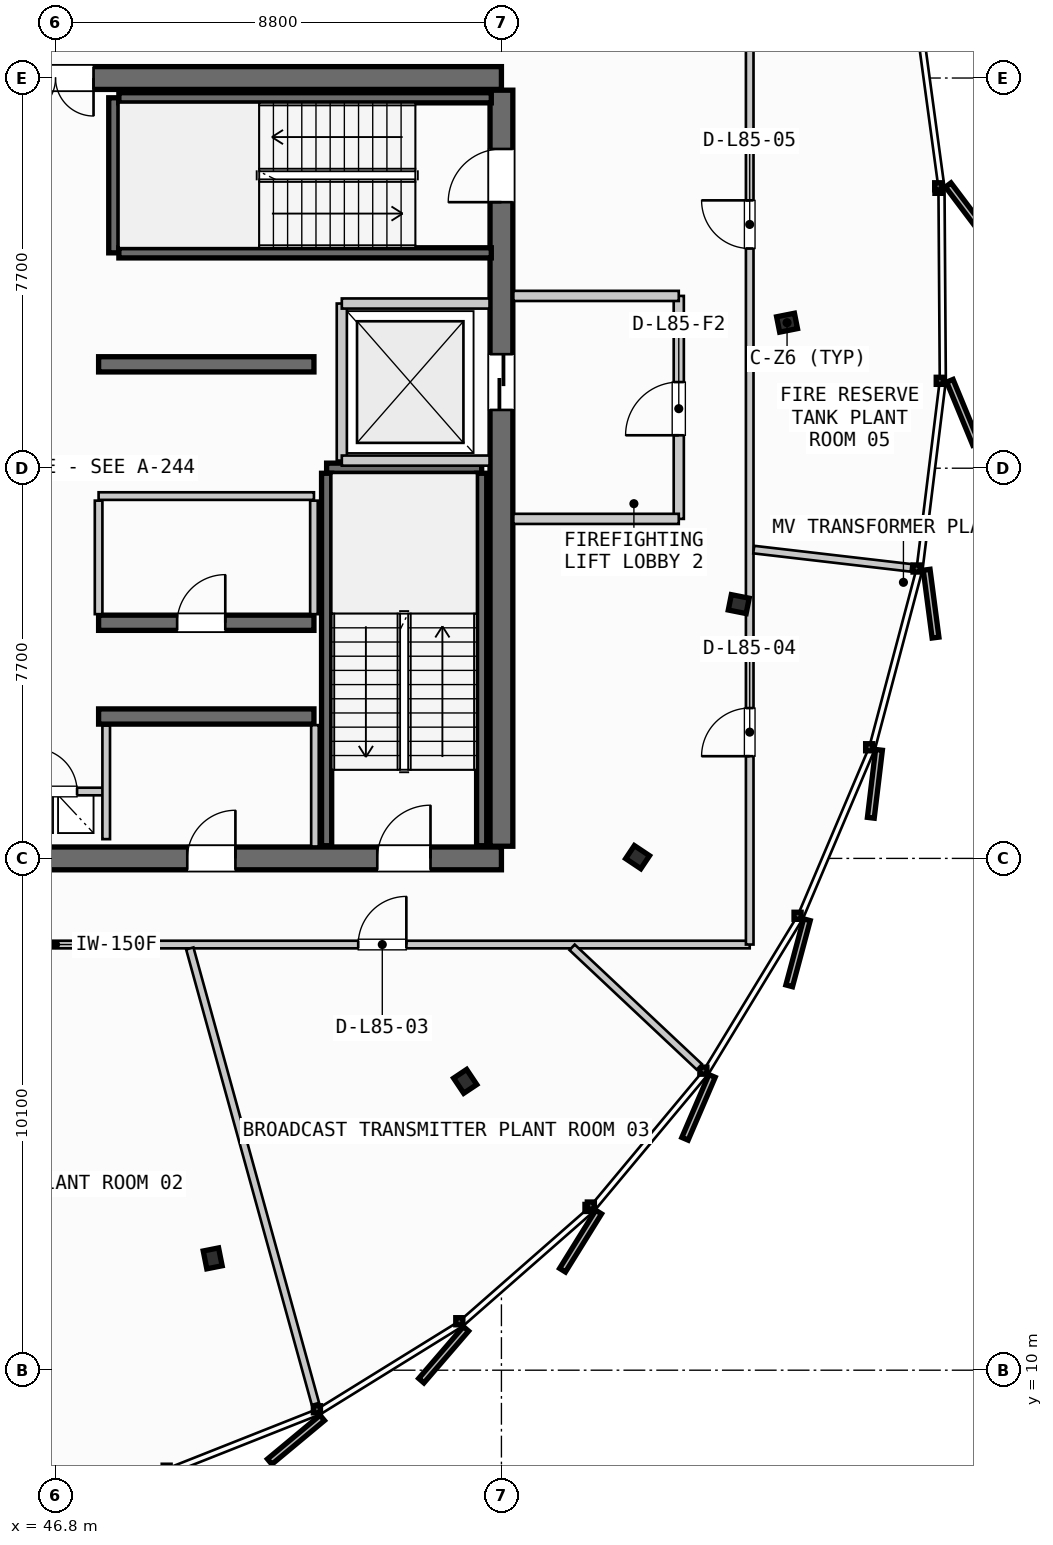
"""IFC4 building model, lengths in metres.
Left out: names, types, materials, properties, quantities, classifications, styles, units other than length and angle.
Written with IfcOpenShell. Run it as: python <this file> out.ifc"""

import sys

from ifc_helpers import new_model, si_unit, direction, frame, frame_2d, origin, origin_2d, place, context, subcontext, project, spatial, rectangle, i_section, extrude, source, transform, mapped, element, fill, save


model = new_model("IFC4")
c1 = context("Model", 3, precision=1e-05, world=origin(), true_north=direction((0.0, 1.0)))
c2 = subcontext(c1, "Body", "Model", "MODEL_VIEW")
j1 = project(units=[si_unit("LENGTHUNIT", "METRE"), si_unit("PLANEANGLEUNIT", "RADIAN")], contexts=[c1])
p1 = place(None, origin())
s1 = spatial("IfcSite", under=j1, at=p1, CompositionType="ELEMENT")
p2 = place(p1, origin())
s2 = spatial("IfcBuilding", under=s1, at=p2, CompositionType="ELEMENT")
p3 = place(p2, frame((0.0, 0.0, 320.3)))
s3 = spatial("IfcBuildingStorey", under=s2, at=p3, CompositionType="ELEMENT", Elevation=320.3)
p4 = place(p3, frame((38.0, 20.1, 0.0), z_axis=(0.0, 0.0, 1.0), x_axis=(1.0, 0.0, 0.0)))
e1 = element("IfcWall", 1, at=p4, inside=s3, PredefinedType="SHEAR", context=c2, shape_type="SweptSolid", body=[
    extrude(rectangle(XDim=17.6, YDim=0.45, at=frame_2d((8.8, 0.0))), origin(), (0.0, 0.0, 1.0), 3.735),
])
p5 = place(p4, frame((1.4, 0.0, 0.0)))
e2 = element("IfcOpeningElement", 2, at=p5, cuts=e1, PredefinedType="OPENING", context=c2, shape_type="SweptSolid", body=[
    extrude(rectangle(XDim=1.05, YDim=2.15, at=frame_2d((0.525, 1.075))), frame((0.0, 0.235, 0.0), z_axis=(0.0, -1.0, 0.0), x_axis=(1.0, 0.0, 0.0)), (0.0, 0.0, 1.0), 0.47),
])
p6 = place(p4, frame((15.15, 0.0, 0.0)))
e3 = element("IfcOpeningElement", 3, at=p6, cuts=e1, PredefinedType="OPENING", context=c2, shape_type="SweptSolid", body=[
    extrude(rectangle(XDim=1.05, YDim=2.15, at=frame_2d((0.525, 1.075))), frame((0.0, 0.235, 0.0), z_axis=(0.0, -1.0, 0.0), x_axis=(1.0, 0.0, 0.0)), (0.0, 0.0, 1.0), 0.47),
])
p7 = place(p4, frame((5.25, 0.0, 0.0)))
e4 = element("IfcOpeningElement", 4, at=p7, cuts=e1, PredefinedType="OPENING", context=c2, shape_type="SweptSolid", body=[
    extrude(rectangle(XDim=0.95, YDim=2.15, at=frame_2d((0.475, 1.075))), frame((0.0, 0.235, 0.0), z_axis=(0.0, -1.0, 0.0), x_axis=(1.0, 0.0, 0.0)), (0.0, 0.0, 1.0), 0.47),
])
p8 = place(p4, frame((11.4, 0.0, 0.0)))
e5 = element("IfcOpeningElement", 5, at=p8, cuts=e1, PredefinedType="OPENING", context=c2, shape_type="SweptSolid", body=[
    extrude(rectangle(XDim=0.95, YDim=2.15, at=frame_2d((0.475, 1.075))), frame((0.0, 0.235, 0.0), z_axis=(0.0, -1.0, 0.0), x_axis=(1.0, 0.0, 0.0)), (0.0, 0.0, 1.0), 0.47),
])
p9 = place(p3, frame((55.6, 35.5, 0.0), z_axis=(0.0, 0.0, 1.0), x_axis=(-1.0, 0.0, 0.0)))
e6 = element("IfcWall", 6, at=p9, inside=s3, PredefinedType="SHEAR", context=c2, shape_type="SweptSolid", body=[
    extrude(rectangle(XDim=17.6, YDim=0.45, at=frame_2d((8.8, 0.0))), origin(), (0.0, 0.0, 1.0), 3.735),
])
p10 = place(p9, frame((8.05, 0.0, 0.0)))
e7 = element("IfcOpeningElement", 7, at=p10, cuts=e6, PredefinedType="OPENING", context=c2, shape_type="SweptSolid", body=[
    extrude(rectangle(XDim=1.5, YDim=2.2, at=frame_2d((0.75, 1.1))), frame((0.0, 0.235, 0.0), z_axis=(0.0, -1.0, 0.0), x_axis=(1.0, 0.0, 0.0)), (0.0, 0.0, 1.0), 0.47),
])
p11 = place(p9, frame((15.85, 0.0, 0.0)))
e8 = element("IfcOpeningElement", 8, at=p11, cuts=e6, PredefinedType="OPENING", context=c2, shape_type="SweptSolid", body=[
    extrude(rectangle(XDim=0.85, YDim=2.15, at=frame_2d((0.425, 1.075))), frame((0.0, 0.235, 0.0), z_axis=(0.0, -1.0, 0.0), x_axis=(1.0, 0.0, 0.0)), (0.0, 0.0, 1.0), 0.47),
])
p12 = place(p9, frame((14.35, 0.0, 0.0)))
e9 = element("IfcOpeningElement", 9, at=p12, cuts=e6, PredefinedType="OPENING", context=c2, shape_type="SweptSolid", body=[
    extrude(rectangle(XDim=0.85, YDim=2.15, at=frame_2d((0.425, 1.075))), frame((0.0, 0.235, 0.0), z_axis=(0.0, -1.0, 0.0), x_axis=(1.0, 0.0, 0.0)), (0.0, 0.0, 1.0), 0.47),
])
p13 = place(p9, frame((12.3, 0.0, 0.0)))
e10 = element("IfcOpeningElement", 10, at=p13, cuts=e6, PredefinedType="OPENING", context=c2, shape_type="SweptSolid", body=[
    extrude(rectangle(XDim=0.95, YDim=2.15, at=frame_2d((0.475, 1.075))), frame((0.0, 0.235, 0.0), z_axis=(0.0, -1.0, 0.0), x_axis=(1.0, 0.0, 0.0)), (0.0, 0.0, 1.0), 0.47),
])
p14 = place(p9, frame((10.2, 0.0, 0.0)))
e11 = element("IfcOpeningElement", 11, at=p14, cuts=e6, PredefinedType="OPENING", context=c2, shape_type="SweptSolid", body=[
    extrude(rectangle(XDim=0.9, YDim=2.15, at=frame_2d((0.45, 1.075))), frame((0.0, 0.235, 0.0), z_axis=(0.0, -1.0, 0.0), x_axis=(1.0, 0.0, 0.0)), (0.0, 0.0, 1.0), 0.47),
])
p15 = place(p3, frame((55.6, 20.34, 0.0), z_axis=(0.0, 0.0, 1.0), x_axis=(0.0, 1.0, 0.0)))
e12 = element("IfcWall", 12, at=p15, inside=s3, PredefinedType="SHEAR", context=c2, shape_type="SweptSolid", body=[
    extrude(rectangle(XDim=14.92, YDim=0.45, at=frame_2d((7.46, 0.0))), origin(), (0.0, 0.0, 1.0), 3.735),
])
p16 = place(p15, frame((12.71, 0.0, 0.0)))
e13 = element("IfcOpeningElement", 13, at=p16, cuts=e12, PredefinedType="OPENING", context=c2, shape_type="SweptSolid", body=[
    extrude(rectangle(XDim=1.05, YDim=2.15, at=frame_2d((0.525, 1.075))), frame((0.0, 0.235, 0.0), z_axis=(0.0, -1.0, 0.0), x_axis=(1.0, 0.0, 0.0)), (0.0, 0.0, 1.0), 0.47),
])
p17 = place(p15, frame((8.61, 0.0, 0.0)))
e14 = element("IfcOpeningElement", 14, at=p17, cuts=e12, PredefinedType="OPENING", context=c2, shape_type="SweptSolid", body=[
    extrude(rectangle(XDim=1.1, YDim=2.2, at=frame_2d((0.55, 1.1))), frame((0.0, 0.235, 0.0), z_axis=(0.0, -1.0, 0.0), x_axis=(1.0, 0.0, 0.0)), (0.0, 0.0, 1.0), 0.47),
])
p18 = place(p3, frame((47.65, 22.9, 0.0), z_axis=(0.0, 0.0, 1.0), x_axis=(1.0, 0.0, 0.0)))
e15 = element("IfcWall", 15, at=p18, inside=s3, PredefinedType="SHEAR", context=c2, shape_type="SweptSolid", body=[
    extrude(rectangle(XDim=4.25, YDim=0.3, at=frame_2d((2.125, 0.0))), origin(), (0.0, 0.0, 1.0), 3.735),
])
p19 = place(p3, frame((47.65, 24.75, 0.0), z_axis=(0.0, 0.0, 1.0), x_axis=(1.0, 0.0, 0.0)))
e16 = element("IfcWall", 16, at=p19, inside=s3, PredefinedType="SHEAR", context=c2, shape_type="SweptSolid", body=[
    extrude(rectangle(XDim=4.25, YDim=0.3, at=frame_2d((2.125, 0.0))), origin(), (0.0, 0.0, 1.0), 3.735),
])
p20 = place(p19, frame((1.55, 0.0, 0.0)))
e17 = element("IfcOpeningElement", 17, at=p20, cuts=e16, PredefinedType="OPENING", context=c2, shape_type="SweptSolid", body=[
    extrude(rectangle(XDim=0.95, YDim=2.15, at=frame_2d((0.475, 1.075))), frame((0.0, 0.16, 0.0), z_axis=(0.0, -1.0, 0.0), x_axis=(1.0, 0.0, 0.0)), (0.0, 0.0, 1.0), 0.32),
])
p21 = place(p3, frame((47.65, 29.85, 0.0), z_axis=(0.0, 0.0, 1.0), x_axis=(1.0, 0.0, 0.0)))
e18 = element("IfcWall", 18, at=p21, inside=s3, PredefinedType="SHEAR", context=c2, shape_type="SweptSolid", body=[
    extrude(rectangle(XDim=4.25, YDim=0.3, at=frame_2d((2.125, 0.0))), origin(), (0.0, 0.0, 1.0), 3.735),
])
m1 = source(origin(), c2, "Body", "SweptSolid", [
    extrude(i_section(OverallWidth=0.309, OverallDepth=0.359, WebThickness=0.016, FlangeThickness=0.026, FilletRadius=0.027, at=origin_2d()), origin(), (0.0, 0.0, 1.0), 3.735),
])
for number, where, z_axis, x_axis in (
    (19, (61.237, 30.672, 0.0), (0.0, 0.0, 1.0), (0.981, 0.195, 0.0)),
    (20, (49.902, 12.207, 0.0), (0.0, 0.0, 1.0), (0.195, -0.981, 0.0)),
    (21, (54.885, 15.7, 0.0), (0.0, 0.0, 1.0), (0.556, -0.831, 0.0)),
    (22, (58.287, 20.125, 0.0), (0.0, 0.0, 1.0), (0.831, -0.556, 0.0)),
    (23, (60.284, 25.118, 0.0), (0.0, 0.0, 1.0), (0.981, -0.195, 0.0)),
):
    element("IfcColumn", number, at=place(p3, frame(where, z_axis=z_axis, x_axis=x_axis)), inside=s3, PredefinedType="COLUMN", context=c2, shape_type="MappedRepresentation", body=[
        mapped(m1, transform((0.0, 0.0, 0.0), scale=1.0)),
    ])
p22 = place(p3, frame((52.15, 27.8, 0.0), z_axis=(0.0, 0.0, 1.0), x_axis=(1.0, 0.0, 0.0)))
e24 = element("IfcWall", 24, at=p22, inside=s3, PredefinedType="SHEAR", context=c2, shape_type="SweptSolid", body=[
    extrude(rectangle(XDim=3.06, YDim=0.2, at=frame_2d((1.53, 0.0))), origin(), (0.0, 0.0, 1.0), 3.735),
])
for number, where, z_axis, x_axis in (
    (25, (55.21, 27.7, 0.0), (0.0, 0.0, 1.0), (0.0, -1.0, 0.0)),
    (26, (52.15, 20.35, 0.0), (0.0, 0.0, 1.0), (0.0, 1.0, 0.0)),
):
    element("IfcWall", number, at=place(p3, frame(where, z_axis=z_axis, x_axis=x_axis)), inside=s3, PredefinedType="SHEAR", context=c2, shape_type="SweptSolid", body=[
        extrude(rectangle(XDim=7.35, YDim=0.2, at=frame_2d((3.675, 0.0))), origin(), (0.0, 0.0, 1.0), 3.735),
    ])
p23 = place(p3, frame((47.95, 32.05, 0.0), z_axis=(0.0, 0.0, 1.0), x_axis=(0.0, 1.0, 0.0)))
e27 = element("IfcWall", 27, at=p23, inside=s3, PredefinedType="SHEAR", context=c2, shape_type="SweptSolid", body=[
    extrude(rectangle(XDim=3.06, YDim=0.2, at=frame_2d((1.53, 0.0))), origin(), (0.0, 0.0, 1.0), 3.735),
])
for number, where, z_axis, x_axis in (
    (28, (48.05, 35.11, 0.0), (0.0, 0.0, 1.0), (1.0, 0.0, 0.0)),
    (29, (55.4, 32.05, 0.0), (0.0, 0.0, 1.0), (-1.0, 0.0, 0.0)),
):
    element("IfcWall", number, at=place(p3, frame(where, z_axis=z_axis, x_axis=x_axis)), inside=s3, PredefinedType="SHEAR", context=c2, shape_type="SweptSolid", body=[
        extrude(rectangle(XDim=7.35, YDim=0.2, at=frame_2d((3.675, 0.0))), origin(), (0.0, 0.0, 1.0), 3.735),
    ])
p24 = place(p3, frame((45.8, 21.42, 0.0), z_axis=(0.0, 0.0, 1.0), x_axis=(1.0, 0.0, 0.0)))
e30 = element("IfcWall", 30, at=p24, inside=s3, PredefinedType="PARTITIONING", context=c2, shape_type="SweptSolid", body=[
    extrude(rectangle(XDim=2.0, YDim=0.15, at=frame_2d((1.0, 0.0))), origin(), (0.0, 0.0, 1.0), 3.26),
])
p25 = place(p24, frame((0.575, 0.0, 0.0)))
e31 = element("IfcOpeningElement", 31, at=p25, cuts=e30, PredefinedType="OPENING", context=c2, shape_type="SweptSolid", body=[
    extrude(rectangle(XDim=0.85, YDim=2.15, at=frame_2d((0.425, 1.075))), frame((0.0, 0.085, 0.0), z_axis=(0.0, -1.0, 0.0), x_axis=(1.0, 0.0, 0.0)), (0.0, 0.0, 1.0), 0.17),
])
p26 = place(p3, frame((47.8, 20.48, 0.0), z_axis=(0.0, 0.0, 1.0), x_axis=(0.0, 1.0, 0.0)))
e32 = element("IfcWall", 32, at=p26, inside=s3, PredefinedType="PARTITIONING", context=c2, shape_type="SweptSolid", body=[
    extrude(rectangle(XDim=2.24, YDim=0.15, at=frame_2d((1.12, 0.0))), origin(), (0.0, 0.0, 1.0), 3.26),
])
p27 = place(p3, frame((52.45, 27.95, 0.0), z_axis=(0.0, 0.0, 1.0), x_axis=(0.0, 1.0, 0.0)))
e33 = element("IfcWall", 33, at=p27, inside=s3, PredefinedType="PARTITIONING", context=c2, shape_type="SweptSolid", body=[
    extrude(rectangle(XDim=3.1, YDim=0.2, at=frame_2d((1.55, 0.0))), origin(), (0.0, 0.0, 1.0), 3.26),
])
for number, where, z_axis, x_axis in (
    (34, (52.45, 27.95, 0.0), (0.0, 0.0, 1.0), (1.0, 0.0, 0.0)),
    (35, (52.45, 31.05, 0.0), (0.0, 0.0, 1.0), (1.0, 0.0, 0.0)),
):
    element("IfcWall", number, at=place(p3, frame(where, z_axis=z_axis, x_axis=x_axis)), inside=s3, PredefinedType="PARTITIONING", context=c2, shape_type="SweptSolid", body=[
        extrude(rectangle(XDim=2.915, YDim=0.2, at=frame_2d((1.458, 0.0))), origin(), (0.0, 0.0, 1.0), 3.26),
    ])
p28 = place(p3, frame((59.1, 26.8, 0.0), z_axis=(0.0, 0.0, 1.0), x_axis=(0.0, 1.0, 0.0)))
e36 = element("IfcWall", 36, at=p28, inside=s3, PredefinedType="PARTITIONING", context=c2, shape_type="SweptSolid", body=[
    extrude(rectangle(XDim=4.4, YDim=0.2, at=frame_2d((2.2, 0.0))), origin(), (0.0, 0.0, 1.0), 3.26),
])
p29 = place(p28, frame((1.65, 0.0, 0.0)))
e37 = element("IfcOpeningElement", 37, at=p29, cuts=e36, PredefinedType="OPENING", context=c2, shape_type="SweptSolid", body=[
    extrude(rectangle(XDim=1.05, YDim=2.15, at=frame_2d((0.525, 1.075))), frame((0.0, 0.11, 0.0), z_axis=(0.0, -1.0, 0.0), x_axis=(1.0, 0.0, 0.0)), (0.0, 0.0, 1.0), 0.22),
])
for number, where, z_axis, x_axis in (
    (38, (55.835, 26.8, 0.0), (0.0, 0.0, 1.0), (1.0, 0.0, 0.0)),
    (39, (55.835, 31.2, 0.0), (0.0, 0.0, 1.0), (1.0, 0.0, 0.0)),
):
    element("IfcWall", number, at=place(p3, frame(where, z_axis=z_axis, x_axis=x_axis)), inside=s3, PredefinedType="PARTITIONING", context=c2, shape_type="SweptSolid", body=[
        extrude(rectangle(XDim=3.265, YDim=0.2, at=frame_2d((1.633, 0.0))), origin(), (0.0, 0.0, 1.0), 3.26),
    ])
p30 = place(p3, frame((51.92, 20.335, 0.0), z_axis=(0.0, 0.0, 1.0), x_axis=(0.0, 1.0, 0.0)))
e40 = element("IfcWall", 40, at=p30, inside=s3, PredefinedType="PARTITIONING", context=c2, shape_type="SweptSolid", body=[
    extrude(rectangle(XDim=2.395, YDim=0.15, at=frame_2d((1.198, 0.0))), origin(), (0.0, 0.0, 1.0), 3.26),
])
p31 = place(p3, frame((47.65, 27.25, 0.0), z_axis=(0.0, 0.0, 1.0), x_axis=(1.0, 0.0, 0.0)))
e41 = element("IfcWall", 41, at=p31, inside=s3, PredefinedType="PARTITIONING", context=c2, shape_type="SweptSolid", body=[
    extrude(rectangle(XDim=4.25, YDim=0.15, at=frame_2d((2.125, 0.0))), origin(), (0.0, 0.0, 1.0), 3.26),
])
for number, where, z_axis, x_axis in (
    (42, (47.65, 24.92, 0.0), (0.0, 0.0, 1.0), (0.0, 1.0, 0.0)),
    (43, (51.9, 24.92, 0.0), (0.0, 0.0, 1.0), (0.0, 1.0, 0.0)),
):
    element("IfcWall", number, at=place(p3, frame(where, z_axis=z_axis, x_axis=x_axis)), inside=s3, PredefinedType="PARTITIONING", context=c2, shape_type="SweptSolid", body=[
        extrude(rectangle(XDim=2.24, YDim=0.15, at=frame_2d((1.12, 0.0))), origin(), (0.0, 0.0, 1.0), 3.26),
    ])
p32 = place(p3, frame((33.1, 18.4, 0.0), z_axis=(0.0, 0.0, 1.0), x_axis=(1.0, 0.0, 0.0)))
e44 = element("IfcWall", 44, at=p32, inside=s3, PredefinedType="PARTITIONING", context=c2, shape_type="SweptSolid", body=[
    extrude(rectangle(XDim=27.4, YDim=0.15, at=frame_2d((13.7, 0.0))), origin(), (0.0, 0.0, 1.0), 3.26),
])
p33 = place(p32, frame((4.257, 0.0, 0.0)))
e45 = element("IfcOpeningElement", 45, at=p33, cuts=e44, PredefinedType="OPENING", context=c2, shape_type="SweptSolid", body=[
    extrude(rectangle(XDim=0.95, YDim=2.15, at=frame_2d((0.475, 1.075))), frame((0.0, 0.085, 0.0), z_axis=(0.0, -1.0, 0.0), x_axis=(1.0, 0.0, 0.0)), (0.0, 0.0, 1.0), 0.17),
])
p34 = place(p32, frame((12.12, 0.0, 0.0)))
e46 = element("IfcOpeningElement", 46, at=p34, cuts=e44, PredefinedType="OPENING", context=c2, shape_type="SweptSolid", body=[
    extrude(rectangle(XDim=0.95, YDim=2.15, at=frame_2d((0.475, 1.075))), frame((0.0, 0.085, 0.0), z_axis=(0.0, -1.0, 0.0), x_axis=(1.0, 0.0, 0.0)), (0.0, 0.0, 1.0), 0.17),
])
p35 = place(p32, frame((19.674, 0.0, 0.0)))
e47 = element("IfcOpeningElement", 47, at=p35, cuts=e44, PredefinedType="OPENING", context=c2, shape_type="SweptSolid", body=[
    extrude(rectangle(XDim=0.95, YDim=2.15, at=frame_2d((0.475, 1.075))), frame((0.0, 0.085, 0.0), z_axis=(0.0, -1.0, 0.0), x_axis=(1.0, 0.0, 0.0)), (0.0, 0.0, 1.0), 0.17),
])
p36 = place(p3, frame((60.5, 18.4, 0.0), z_axis=(0.0, 0.0, 1.0), x_axis=(0.0, 1.0, 0.0)))
e48 = element("IfcWall", 48, at=p36, inside=s3, PredefinedType="PARTITIONING", context=c2, shape_type="SweptSolid", body=[
    extrude(rectangle(XDim=18.8, YDim=0.15, at=frame_2d((9.4, 0.0))), origin(), (0.0, 0.0, 1.0), 3.26),
])
p37 = place(p36, frame((3.717, 0.0, 0.0)))
e49 = element("IfcOpeningElement", 49, at=p37, cuts=e48, PredefinedType="OPENING", context=c2, shape_type="SweptSolid", body=[
    extrude(rectangle(XDim=0.95, YDim=2.15, at=frame_2d((0.475, 1.075))), frame((0.0, 0.085, 0.0), z_axis=(0.0, -1.0, 0.0), x_axis=(1.0, 0.0, 0.0)), (0.0, 0.0, 1.0), 0.17),
])
p38 = place(p36, frame((13.736, 0.0, 0.0)))
e50 = element("IfcOpeningElement", 50, at=p38, cuts=e48, PredefinedType="OPENING", context=c2, shape_type="SweptSolid", body=[
    extrude(rectangle(XDim=0.95, YDim=2.15, at=frame_2d((0.475, 1.075))), frame((0.0, 0.085, 0.0), z_axis=(0.0, -1.0, 0.0), x_axis=(1.0, 0.0, 0.0)), (0.0, 0.0, 1.0), 0.17),
])
p39 = place(p3, frame((49.45, 18.323, 0.0), z_axis=(0.0, 0.0, 1.0), x_axis=(0.265908021181, -0.963998404704, 0.0)))
e51 = element("IfcWall", 51, at=p39, inside=s3, PredefinedType="PARTITIONING", context=c2, shape_type="SweptSolid", body=[
    extrude(rectangle(XDim=9.324, YDim=0.15, at=frame_2d((4.662, 0.0))), origin(), (0.0, 0.0, 1.0), 3.26),
])
p40 = place(p3, frame((56.995, 18.345, 0.0), z_axis=(0.0, 0.0, 1.0), x_axis=(0.728734466028, -0.684796377052, 0.0)))
e52 = element("IfcWall", 52, at=p40, inside=s3, PredefinedType="PARTITIONING", context=c2, shape_type="SweptSolid", body=[
    extrude(rectangle(XDim=3.445, YDim=0.15, at=frame_2d((1.723, 0.0))), origin(), (0.0, 0.0, 1.0), 3.26),
])
p41 = place(p3, frame((60.58, 26.194, 0.0), z_axis=(0.0, 0.0, 1.0), x_axis=(0.993303836754, -0.115531328606, 0.0)))
e53 = element("IfcWall", 53, at=p41, inside=s3, PredefinedType="PARTITIONING", context=c2, shape_type="SweptSolid", body=[
    extrude(rectangle(XDim=3.125, YDim=0.15, at=frame_2d((1.563, 0.0))), origin(), (0.0, 0.0, 1.0), 3.26),
])
m2 = source(origin(), c2, "Body", "SweptSolid", [
    extrude(rectangle(XDim=1.05, YDim=2.15, at=frame_2d((0.525, 1.075))), frame((0.0, 0.025, 0.0), z_axis=(0.0, -1.0, 0.0), x_axis=(1.0, 0.0, 0.0)), (0.0, 0.0, 1.0), 0.05),
])
p42 = place(p6, origin())
e54 = element("IfcDoor", 54, at=p42, inside=s3, OperationType="SINGLE_SWING_RIGHT", PredefinedType="DOOR", context=c2, shape_type="MappedRepresentation", body=[
    mapped(m2, transform((0.0, 0.0, 0.0), scale=1.0)),
])
fill(e3, e54)
p43 = place(p16, origin())
e55 = element("IfcDoor", 55, at=p43, inside=s3, OperationType="SINGLE_SWING_LEFT", PredefinedType="DOOR", context=c2, shape_type="MappedRepresentation", body=[
    mapped(m2, transform((0.0, 0.0, 0.0), scale=1.0)),
])
fill(e13, e55)
m3 = source(origin(), c2, "Body", "SweptSolid", [
    extrude(rectangle(XDim=1.5, YDim=2.2, at=frame_2d((0.75, 1.1))), frame((0.0, 0.025, 0.0), z_axis=(0.0, -1.0, 0.0), x_axis=(1.0, 0.0, 0.0)), (0.0, 0.0, 1.0), 0.05),
])
p44 = place(p10, origin())
e56 = element("IfcDoor", 56, at=p44, inside=s3, OperationType="DOUBLE_DOOR_SINGLE_SWING", PredefinedType="DOOR", context=c2, shape_type="MappedRepresentation", body=[
    mapped(m3, transform((0.0, 0.0, 0.0), scale=1.0)),
])
fill(e7, e56)
m4 = source(origin(), c2, "Body", "SweptSolid", [
    extrude(rectangle(XDim=1.1, YDim=2.2, at=frame_2d((0.55, 1.1))), frame((0.0, 0.025, 0.0), z_axis=(0.0, -1.0, 0.0), x_axis=(1.0, 0.0, 0.0)), (0.0, 0.0, 1.0), 0.05),
])
p45 = place(p17, origin())
e57 = element("IfcDoor", 57, at=p45, inside=s3, OperationType="SLIDING_TO_RIGHT", PredefinedType="DOOR", context=c2, shape_type="MappedRepresentation", body=[
    mapped(m4, transform((0.0, 0.0, 0.0), scale=1.0)),
])
fill(e14, e57)
m5 = source(origin(), c2, "Body", "SweptSolid", [
    extrude(rectangle(XDim=0.95, YDim=2.15, at=frame_2d((0.475, 1.075))), frame((0.0, 0.025, 0.0), z_axis=(0.0, -1.0, 0.0), x_axis=(1.0, 0.0, 0.0)), (0.0, 0.0, 1.0), 0.05),
])
p46 = place(p8, origin())
e58 = element("IfcDoor", 58, at=p46, inside=s3, OperationType="SINGLE_SWING_RIGHT", PredefinedType="DOOR", context=c2, shape_type="MappedRepresentation", body=[
    mapped(m5, transform((0.0, 0.0, 0.0), scale=1.0)),
])
fill(e5, e58)
p47 = place(p20, origin())
e59 = element("IfcDoor", 59, at=p47, inside=s3, OperationType="SINGLE_SWING_RIGHT", PredefinedType="DOOR", context=c2, shape_type="MappedRepresentation", body=[
    mapped(m5, transform((0.0, 0.0, 0.0), scale=1.0)),
])
fill(e17, e59)
p48 = place(p29, origin())
e60 = element("IfcDoor", 60, at=p48, inside=s3, OperationType="SINGLE_SWING_LEFT", PredefinedType="DOOR", context=c2, shape_type="MappedRepresentation", body=[
    mapped(m2, transform((0.0, 0.0, 0.0), scale=1.0)),
])
fill(e37, e60)
p49 = place(p35, origin())
e61 = element("IfcDoor", 61, at=p49, inside=s3, OperationType="SINGLE_SWING_RIGHT", PredefinedType="DOOR", context=c2, shape_type="MappedRepresentation", body=[
    mapped(m5, transform((0.0, 0.0, 0.0), scale=1.0)),
])
fill(e47, e61)
p50 = place(p37, origin())
e62 = element("IfcDoor", 62, at=p50, inside=s3, OperationType="SINGLE_SWING_LEFT", PredefinedType="DOOR", context=c2, shape_type="MappedRepresentation", body=[
    mapped(m5, transform((0.0, 0.0, 0.0), scale=1.0)),
])
fill(e49, e62)
p51 = place(p38, origin())
e63 = element("IfcDoor", 63, at=p51, inside=s3, OperationType="SINGLE_SWING_RIGHT", PredefinedType="DOOR", context=c2, shape_type="MappedRepresentation", body=[
    mapped(m5, transform((0.0, 0.0, 0.0), scale=1.0)),
])
fill(e50, e63)
m6 = source(origin(), c2, "Body", "SweptSolid", [
    extrude(rectangle(XDim=0.85, YDim=2.15, at=frame_2d((0.425, 1.075))), frame((0.0, 0.025, 0.0), z_axis=(0.0, -1.0, 0.0), x_axis=(1.0, 0.0, 0.0)), (0.0, 0.0, 1.0), 0.05),
])
p52 = place(p25, origin())
e64 = element("IfcDoor", 64, at=p52, inside=s3, OperationType="SINGLE_SWING_LEFT", PredefinedType="DOOR", context=c2, shape_type="MappedRepresentation", body=[
    mapped(m6, transform((0.0, 0.0, 0.0), scale=1.0)),
])
fill(e31, e64)
save(model, sys.argv[1])
